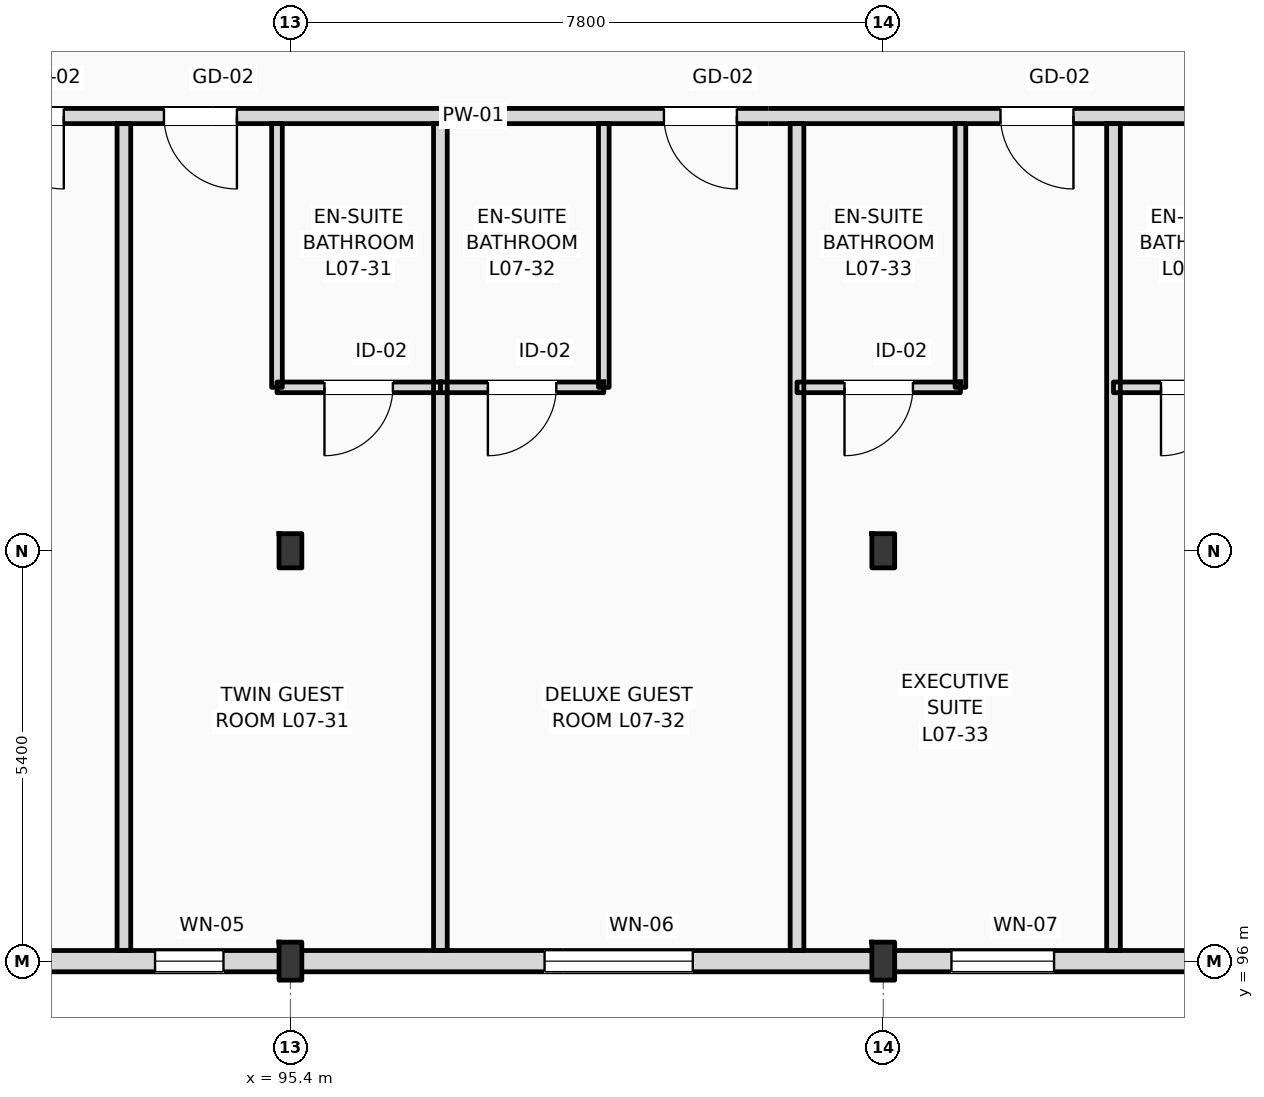
"""IFC4 building model, lengths in metres.
Left out: names, types, materials, properties, quantities, classifications, styles, units other than length and angle.
Written with IfcOpenShell. Run it as: python <this file> out.ifc"""

import sys

from ifc_helpers import new_model, si_unit, direction, frame, frame_2d, origin, origin_2d, place, context, subcontext, project, spatial, rectangle, i_section, extrude, element, fill, save


model = new_model("IFC4")
c1 = context("Model", 3, precision=1e-05, world=origin(), true_north=direction((0.0, 1.0)))
c2 = subcontext(c1, "Body", "Model", "MODEL_VIEW")
j1 = project(units=[si_unit("LENGTHUNIT", "METRE"), si_unit("PLANEANGLEUNIT", "RADIAN")], contexts=[c1])
p1 = place(None, origin())
s1 = spatial("IfcSite", under=j1, at=p1, CompositionType="ELEMENT")
p2 = place(p1, origin())
s2 = spatial("IfcBuilding", under=s1, at=p2, CompositionType="ELEMENT")
p3 = place(p2, frame((0.0, 0.0, 31.8)))
s3 = spatial("IfcBuildingStorey", under=s2, at=p3, CompositionType="ELEMENT", Elevation=31.8)
p4 = place(p3, frame((95.4, 96.0, 0.0), z_axis=(0.0, 0.0, 1.0), x_axis=(1.0, 0.0, 0.0)))
e1 = element("IfcColumn", 1, at=p4, inside=s3, PredefinedType="COLUMN", context=c2, shape_type="SweptSolid", body=[
    extrude(i_section(OverallWidth=0.3, OverallDepth=0.5, WebThickness=0.014, FlangeThickness=0.028, FilletRadius=0.027, at=origin_2d()), origin(), (0.0, 0.0, 1.0), 3.6),
])
p5 = place(p3, frame((95.4, 101.4, 0.0), z_axis=(0.0, 0.0, 1.0), x_axis=(1.0, 0.0, 0.0)))
e2 = element("IfcColumn", 2, at=p5, inside=s3, PredefinedType="COLUMN", context=c2, shape_type="SweptSolid", body=[
    extrude(i_section(OverallWidth=0.3, OverallDepth=0.45, WebThickness=0.014, FlangeThickness=0.026, FilletRadius=0.027, at=origin_2d()), origin(), (0.0, 0.0, 1.0), 3.6),
])
p6 = place(p3, frame((103.2, 96.0, 0.0), z_axis=(0.0, 0.0, 1.0), x_axis=(1.0, 0.0, 0.0)))
e3 = element("IfcColumn", 3, at=p6, inside=s3, PredefinedType="COLUMN", context=c2, shape_type="SweptSolid", body=[
    extrude(i_section(OverallWidth=0.3, OverallDepth=0.5, WebThickness=0.014, FlangeThickness=0.028, FilletRadius=0.027, at=origin_2d()), origin(), (0.0, 0.0, 1.0), 3.6),
])
p7 = place(p3, frame((103.2, 101.4, 0.0), z_axis=(0.0, 0.0, 1.0), x_axis=(1.0, 0.0, 0.0)))
e4 = element("IfcColumn", 4, at=p7, inside=s3, PredefinedType="COLUMN", context=c2, shape_type="SweptSolid", body=[
    extrude(i_section(OverallWidth=0.3, OverallDepth=0.45, WebThickness=0.014, FlangeThickness=0.026, FilletRadius=0.027, at=origin_2d()), origin(), (0.0, 0.0, 1.0), 3.6),
])
p8 = place(p3, frame((25.2, 96.0, 0.0), z_axis=(0.0, 0.0, 1.0), x_axis=(1.0, 0.0, 0.0)))
e5 = element("IfcWall", 5, at=p8, inside=s3, PredefinedType="STANDARD", context=c2, shape_type="SweptSolid", body=[
    extrude(rectangle(XDim=94.8, YDim=0.28, at=frame_2d((47.4, 0.0))), origin(), (0.0, 0.0, 1.0), 2.72),
])
p9 = place(p8, frame((16.394, 0.0, 0.9)))
e6 = element("IfcOpeningElement", 6, at=p9, cuts=e5, PredefinedType="OPENING", context=c2, shape_type="SweptSolid", body=[
    extrude(rectangle(XDim=2.0, YDim=1.64, at=frame_2d((1.0, 0.82))), frame((0.0, 0.15, 0.0), z_axis=(0.0, -1.0, 0.0), x_axis=(1.0, 0.0, 0.0)), (0.0, 0.0, 1.0), 0.3),
])
p10 = place(p8, frame((20.207, 0.0, 0.9)))
e7 = element("IfcOpeningElement", 7, at=p10, cuts=e5, PredefinedType="OPENING", context=c2, shape_type="SweptSolid", body=[
    extrude(rectangle(XDim=2.3, YDim=1.64, at=frame_2d((1.15, 0.82))), frame((0.0, 0.15, 0.0), z_axis=(0.0, -1.0, 0.0), x_axis=(1.0, 0.0, 0.0)), (0.0, 0.0, 1.0), 0.3),
])
p11 = place(p8, frame((24.287, 0.0, 0.9)))
e8 = element("IfcOpeningElement", 8, at=p11, cuts=e5, PredefinedType="OPENING", context=c2, shape_type="SweptSolid", body=[
    extrude(rectangle(XDim=2.358, YDim=1.64, at=frame_2d((1.179, 0.82))), frame((0.0, 0.15, 0.0), z_axis=(0.0, -1.0, 0.0), x_axis=(1.0, 0.0, 0.0)), (0.0, 0.0, 1.0), 0.3),
])
p12 = place(p8, frame((27.665, 0.0, 0.9)))
e9 = element("IfcOpeningElement", 9, at=p12, cuts=e5, PredefinedType="OPENING", context=c2, shape_type="SweptSolid", body=[
    extrude(rectangle(XDim=1.8, YDim=1.64, at=frame_2d((0.9, 0.82))), frame((0.0, 0.15, 0.0), z_axis=(0.0, -1.0, 0.0), x_axis=(1.0, 0.0, 0.0)), (0.0, 0.0, 1.0), 0.3),
])
p13 = place(p8, frame((32.103, 0.0, 0.9)))
e10 = element("IfcOpeningElement", 10, at=p13, cuts=e5, PredefinedType="OPENING", context=c2, shape_type="SweptSolid", body=[
    extrude(rectangle(XDim=2.359, YDim=1.64, at=frame_2d((1.179, 0.82))), frame((0.0, 0.15, 0.0), z_axis=(0.0, -1.0, 0.0), x_axis=(1.0, 0.0, 0.0)), (0.0, 0.0, 1.0), 0.3),
])
p14 = place(p8, frame((36.336, 0.0, 0.9)))
e11 = element("IfcOpeningElement", 11, at=p14, cuts=e5, PredefinedType="OPENING", context=c2, shape_type="SweptSolid", body=[
    extrude(rectangle(XDim=1.2, YDim=1.64, at=frame_2d((0.6, 0.82))), frame((0.0, 0.15, 0.0), z_axis=(0.0, -1.0, 0.0), x_axis=(1.0, 0.0, 0.0)), (0.0, 0.0, 1.0), 0.3),
])
p15 = place(p8, frame((56.177, 0.0, 0.9)))
e12 = element("IfcOpeningElement", 12, at=p15, cuts=e5, PredefinedType="OPENING", context=c2, shape_type="SweptSolid", body=[
    extrude(rectangle(XDim=1.35, YDim=1.64, at=frame_2d((0.675, 0.82))), frame((0.0, 0.15, 0.0), z_axis=(0.0, -1.0, 0.0), x_axis=(1.0, 0.0, 0.0)), (0.0, 0.0, 1.0), 0.3),
])
p16 = place(p8, frame((60.086, 0.0, 0.9)))
e13 = element("IfcOpeningElement", 13, at=p16, cuts=e5, PredefinedType="OPENING", context=c2, shape_type="SweptSolid", body=[
    extrude(rectangle(XDim=1.5, YDim=1.64, at=frame_2d((0.75, 0.82))), frame((0.0, 0.15, 0.0), z_axis=(0.0, -1.0, 0.0), x_axis=(1.0, 0.0, 0.0)), (0.0, 0.0, 1.0), 0.3),
])
p17 = place(p8, frame((64.838, 0.0, 0.9)))
e14 = element("IfcOpeningElement", 14, at=p17, cuts=e5, PredefinedType="OPENING", context=c2, shape_type="SweptSolid", body=[
    extrude(rectangle(XDim=1.65, YDim=1.64, at=frame_2d((0.825, 0.82))), frame((0.0, 0.15, 0.0), z_axis=(0.0, -1.0, 0.0), x_axis=(1.0, 0.0, 0.0)), (0.0, 0.0, 1.0), 0.3),
])
p18 = place(p8, frame((68.419, 0.0, 0.9)))
e15 = element("IfcOpeningElement", 15, at=p18, cuts=e5, PredefinedType="OPENING", context=c2, shape_type="SweptSolid", body=[
    extrude(rectangle(XDim=0.9, YDim=1.64, at=frame_2d((0.45, 0.82))), frame((0.0, 0.15, 0.0), z_axis=(0.0, -1.0, 0.0), x_axis=(1.0, 0.0, 0.0)), (0.0, 0.0, 1.0), 0.3),
])
p19 = place(p8, frame((73.544, 0.0, 0.9)))
e16 = element("IfcOpeningElement", 16, at=p19, cuts=e5, PredefinedType="OPENING", context=c2, shape_type="SweptSolid", body=[
    extrude(rectangle(XDim=1.95, YDim=1.64, at=frame_2d((0.975, 0.82))), frame((0.0, 0.15, 0.0), z_axis=(0.0, -1.0, 0.0), x_axis=(1.0, 0.0, 0.0)), (0.0, 0.0, 1.0), 0.3),
])
p20 = place(p8, frame((78.897, 0.0, 0.9)))
e17 = element("IfcOpeningElement", 17, at=p20, cuts=e5, PredefinedType="OPENING", context=c2, shape_type="SweptSolid", body=[
    extrude(rectangle(XDim=1.35, YDim=1.64, at=frame_2d((0.675, 0.82))), frame((0.0, 0.15, 0.0), z_axis=(0.0, -1.0, 0.0), x_axis=(1.0, 0.0, 0.0)), (0.0, 0.0, 1.0), 0.3),
])
p21 = place(p8, frame((82.249, 0.0, 0.9)))
e18 = element("IfcOpeningElement", 18, at=p21, cuts=e5, PredefinedType="OPENING", context=c2, shape_type="SweptSolid", body=[
    extrude(rectangle(XDim=2.25, YDim=1.64, at=frame_2d((1.125, 0.82))), frame((0.0, 0.15, 0.0), z_axis=(0.0, -1.0, 0.0), x_axis=(1.0, 0.0, 0.0)), (0.0, 0.0, 1.0), 0.3),
])
p22 = place(p8, frame((87.202, 0.0, 0.9)))
e19 = element("IfcOpeningElement", 19, at=p22, cuts=e5, PredefinedType="OPENING", context=c2, shape_type="SweptSolid", body=[
    extrude(rectangle(XDim=1.8, YDim=1.64, at=frame_2d((0.9, 0.82))), frame((0.0, 0.15, 0.0), z_axis=(0.0, -1.0, 0.0), x_axis=(1.0, 0.0, 0.0)), (0.0, 0.0, 1.0), 0.3),
])
p23 = place(p8, frame((90.867, 0.0, 0.9)))
e20 = element("IfcOpeningElement", 20, at=p23, cuts=e5, PredefinedType="OPENING", context=c2, shape_type="SweptSolid", body=[
    extrude(rectangle(XDim=2.55, YDim=1.64, at=frame_2d((1.275, 0.82))), frame((0.0, 0.15, 0.0), z_axis=(0.0, -1.0, 0.0), x_axis=(1.0, 0.0, 0.0)), (0.0, 0.0, 1.0), 0.3),
])
p24 = place(p3, frame((79.76, 107.12, 0.0), z_axis=(0.0, 0.0, 1.0), x_axis=(1.0, 0.0, 0.0)))
e21 = element("IfcWall", 21, at=p24, inside=s3, PredefinedType="PARTITIONING", context=c2, shape_type="SweptSolid", body=[
    extrude(rectangle(XDim=40.1, YDim=0.2, at=frame_2d((20.05, 0.0))), origin(), (0.0, 0.0, 1.0), 3.36),
])
p25 = place(p24, frame((2.887, 0.0, 0.0)))
e22 = element("IfcOpeningElement", 22, at=p25, cuts=e21, PredefinedType="OPENING", context=c2, shape_type="SweptSolid", body=[
    extrude(rectangle(XDim=0.96, YDim=2.2, at=frame_2d((0.48, 1.1))), frame((0.0, 0.11, 0.0), z_axis=(0.0, -1.0, 0.0), x_axis=(1.0, 0.0, 0.0)), (0.0, 0.0, 1.0), 0.22),
])
p26 = place(p24, frame((5.121, 0.0, 0.0)))
e23 = element("IfcOpeningElement", 23, at=p26, cuts=e21, PredefinedType="OPENING", context=c2, shape_type="SweptSolid", body=[
    extrude(rectangle(XDim=0.96, YDim=2.2, at=frame_2d((0.48, 1.1))), frame((0.0, 0.11, 0.0), z_axis=(0.0, -1.0, 0.0), x_axis=(1.0, 0.0, 0.0)), (0.0, 0.0, 1.0), 0.22),
])
p27 = place(p24, frame((11.698, 0.0, 0.0)))
e24 = element("IfcOpeningElement", 24, at=p27, cuts=e21, PredefinedType="OPENING", context=c2, shape_type="SweptSolid", body=[
    extrude(rectangle(XDim=0.96, YDim=2.2, at=frame_2d((0.48, 1.1))), frame((0.0, 0.11, 0.0), z_axis=(0.0, -1.0, 0.0), x_axis=(1.0, 0.0, 0.0)), (0.0, 0.0, 1.0), 0.22),
])
p28 = place(p24, frame((13.976, 0.0, 0.0)))
e25 = element("IfcOpeningElement", 25, at=p28, cuts=e21, PredefinedType="OPENING", context=c2, shape_type="SweptSolid", body=[
    extrude(rectangle(XDim=0.96, YDim=2.2, at=frame_2d((0.48, 1.1))), frame((0.0, 0.11, 0.0), z_axis=(0.0, -1.0, 0.0), x_axis=(1.0, 0.0, 0.0)), (0.0, 0.0, 1.0), 0.22),
])
p29 = place(p24, frame((20.554, 0.0, 0.0)))
e26 = element("IfcOpeningElement", 26, at=p29, cuts=e21, PredefinedType="OPENING", context=c2, shape_type="SweptSolid", body=[
    extrude(rectangle(XDim=0.96, YDim=2.2, at=frame_2d((0.48, 1.1))), frame((0.0, 0.11, 0.0), z_axis=(0.0, -1.0, 0.0), x_axis=(1.0, 0.0, 0.0)), (0.0, 0.0, 1.0), 0.22),
])
p30 = place(p24, frame((24.982, 0.0, 0.0)))
e27 = element("IfcOpeningElement", 27, at=p30, cuts=e21, PredefinedType="OPENING", context=c2, shape_type="SweptSolid", body=[
    extrude(rectangle(XDim=0.96, YDim=2.2, at=frame_2d((0.48, 1.1))), frame((0.0, 0.11, 0.0), z_axis=(0.0, -1.0, 0.0), x_axis=(1.0, 0.0, 0.0)), (0.0, 0.0, 1.0), 0.22),
])
p31 = place(p24, frame((29.409, 0.0, 0.0)))
e28 = element("IfcOpeningElement", 28, at=p31, cuts=e21, PredefinedType="OPENING", context=c2, shape_type="SweptSolid", body=[
    extrude(rectangle(XDim=0.96, YDim=2.2, at=frame_2d((0.48, 1.1))), frame((0.0, 0.11, 0.0), z_axis=(0.0, -1.0, 0.0), x_axis=(1.0, 0.0, 0.0)), (0.0, 0.0, 1.0), 0.22),
])
p32 = place(p24, frame((33.837, 0.0, 0.0)))
e29 = element("IfcOpeningElement", 29, at=p32, cuts=e21, PredefinedType="OPENING", context=c2, shape_type="SweptSolid", body=[
    extrude(rectangle(XDim=0.96, YDim=2.2, at=frame_2d((0.48, 1.1))), frame((0.0, 0.11, 0.0), z_axis=(0.0, -1.0, 0.0), x_axis=(1.0, 0.0, 0.0)), (0.0, 0.0, 1.0), 0.22),
])
p33 = place(p24, frame((36.027, 0.0, 0.0)))
e30 = element("IfcOpeningElement", 30, at=p33, cuts=e21, PredefinedType="OPENING", context=c2, shape_type="SweptSolid", body=[
    extrude(rectangle(XDim=0.96, YDim=2.2, at=frame_2d((0.48, 1.1))), frame((0.0, 0.11, 0.0), z_axis=(0.0, -1.0, 0.0), x_axis=(1.0, 0.0, 0.0)), (0.0, 0.0, 1.0), 0.22),
])
for number, where, z_axis, x_axis in (
    (31, (93.209, 96.14, 0.0), (0.0, 0.0, 1.0), (0.0, 1.0, 0.0)),
    (32, (97.373, 96.14, 0.0), (0.0, 0.0, 1.0), (0.0, 1.0, 0.0)),
):
    element("IfcWall", number, at=place(p3, frame(where, z_axis=z_axis, x_axis=x_axis)), inside=s3, PredefinedType="PARTITIONING", context=c2, shape_type="SweptSolid", body=[
        extrude(rectangle(XDim=10.88, YDim=0.18, at=frame_2d((5.44, 0.0))), origin(), (0.0, 0.0, 1.0), 3.36),
    ])
p34 = place(p3, frame((95.223, 103.55, 0.0), z_axis=(0.0, 0.0, 1.0), x_axis=(0.0, 1.0, 0.0)))
e33 = element("IfcWall", 33, at=p34, inside=s3, PredefinedType="PARTITIONING", context=c2, shape_type="SweptSolid", body=[
    extrude(rectangle(XDim=3.47, YDim=0.14, at=frame_2d((1.735, 0.0))), origin(), (0.0, 0.0, 1.0), 2.91),
])
p35 = place(p3, frame((95.223, 103.55, 0.0), z_axis=(0.0, 0.0, 1.0), x_axis=(1.0, 0.0, 0.0)))
e34 = element("IfcWall", 34, at=p35, inside=s3, PredefinedType="PARTITIONING", context=c2, shape_type="SweptSolid", body=[
    extrude(rectangle(XDim=2.15, YDim=0.14, at=frame_2d((1.075, 0.0))), origin(), (0.0, 0.0, 1.0), 3.36),
])
p36 = place(p35, frame((0.625, 0.0, 0.0)))
e35 = element("IfcOpeningElement", 35, at=p36, cuts=e34, PredefinedType="OPENING", context=c2, shape_type="SweptSolid", body=[
    extrude(rectangle(XDim=0.9, YDim=2.1, at=frame_2d((0.45, 1.05))), frame((0.0, 0.08, 0.0), z_axis=(0.0, -1.0, 0.0), x_axis=(1.0, 0.0, 0.0)), (0.0, 0.0, 1.0), 0.16),
])
p37 = place(p3, frame((102.065, 96.14, 0.0), z_axis=(0.0, 0.0, 1.0), x_axis=(0.0, 1.0, 0.0)))
e36 = element("IfcWall", 36, at=p37, inside=s3, PredefinedType="PARTITIONING", context=c2, shape_type="SweptSolid", body=[
    extrude(rectangle(XDim=10.88, YDim=0.18, at=frame_2d((5.44, 0.0))), origin(), (0.0, 0.0, 1.0), 3.36),
])
p38 = place(p3, frame((99.523, 103.55, 0.0), z_axis=(0.0, 0.0, 1.0), x_axis=(0.0, 1.0, 0.0)))
e37 = element("IfcWall", 37, at=p38, inside=s3, PredefinedType="PARTITIONING", context=c2, shape_type="SweptSolid", body=[
    extrude(rectangle(XDim=3.47, YDim=0.14, at=frame_2d((1.735, 0.0))), origin(), (0.0, 0.0, 1.0), 3.36),
])
p39 = place(p3, frame((97.373, 103.55, 0.0), z_axis=(0.0, 0.0, 1.0), x_axis=(1.0, 0.0, 0.0)))
e38 = element("IfcWall", 38, at=p39, inside=s3, PredefinedType="PARTITIONING", context=c2, shape_type="SweptSolid", body=[
    extrude(rectangle(XDim=2.15, YDim=0.14, at=frame_2d((1.075, 0.0))), origin(), (0.0, 0.0, 1.0), 3.36),
])
p40 = place(p39, frame((0.625, 0.0, 0.0)))
e39 = element("IfcOpeningElement", 39, at=p40, cuts=e38, PredefinedType="OPENING", context=c2, shape_type="SweptSolid", body=[
    extrude(rectangle(XDim=0.9, YDim=2.1, at=frame_2d((0.45, 1.05))), frame((0.0, 0.08, 0.0), z_axis=(0.0, -1.0, 0.0), x_axis=(1.0, 0.0, 0.0)), (0.0, 0.0, 1.0), 0.16),
])
p41 = place(p3, frame((106.229, 96.14, 0.0), z_axis=(0.0, 0.0, 1.0), x_axis=(0.0, 1.0, 0.0)))
e40 = element("IfcWall", 40, at=p41, inside=s3, PredefinedType="PARTITIONING", context=c2, shape_type="SweptSolid", body=[
    extrude(rectangle(XDim=10.88, YDim=0.18, at=frame_2d((5.44, 0.0))), origin(), (0.0, 0.0, 1.0), 2.97),
])
p42 = place(p3, frame((104.215, 103.55, 0.0), z_axis=(0.0, 0.0, 1.0), x_axis=(0.0, 1.0, 0.0)))
e41 = element("IfcWall", 41, at=p42, inside=s3, PredefinedType="PARTITIONING", context=c2, shape_type="SweptSolid", body=[
    extrude(rectangle(XDim=3.47, YDim=0.14, at=frame_2d((1.735, 0.0))), origin(), (0.0, 0.0, 1.0), 3.36),
])
p43 = place(p3, frame((102.065, 103.55, 0.0), z_axis=(0.0, 0.0, 1.0), x_axis=(1.0, 0.0, 0.0)))
e42 = element("IfcWall", 42, at=p43, inside=s3, PredefinedType="PARTITIONING", context=c2, shape_type="SweptSolid", body=[
    extrude(rectangle(XDim=2.15, YDim=0.14, at=frame_2d((1.075, 0.0))), origin(), (0.0, 0.0, 1.0), 3.36),
])
p44 = place(p43, frame((0.625, 0.0, 0.0)))
e43 = element("IfcOpeningElement", 43, at=p44, cuts=e42, PredefinedType="OPENING", context=c2, shape_type="SweptSolid", body=[
    extrude(rectangle(XDim=0.9, YDim=2.1, at=frame_2d((0.45, 1.05))), frame((0.0, 0.08, 0.0), z_axis=(0.0, -1.0, 0.0), x_axis=(1.0, 0.0, 0.0)), (0.0, 0.0, 1.0), 0.16),
])
p45 = place(p3, frame((106.229, 103.55, 0.0), z_axis=(0.0, 0.0, 1.0), x_axis=(1.0, 0.0, 0.0)))
e44 = element("IfcWall", 44, at=p45, inside=s3, PredefinedType="PARTITIONING", context=c2, shape_type="SweptSolid", body=[
    extrude(rectangle(XDim=2.15, YDim=0.14, at=frame_2d((1.075, 0.0))), origin(), (0.0, 0.0, 1.0), 3.36),
])
p46 = place(p45, frame((0.625, 0.0, 0.0)))
e45 = element("IfcOpeningElement", 45, at=p46, cuts=e44, PredefinedType="OPENING", context=c2, shape_type="SweptSolid", body=[
    extrude(rectangle(XDim=0.9, YDim=2.1, at=frame_2d((0.45, 1.05))), frame((0.0, 0.08, 0.0), z_axis=(0.0, -1.0, 0.0), x_axis=(1.0, 0.0, 0.0)), (0.0, 0.0, 1.0), 0.16),
])
p47 = place(p18, origin())
e46 = element("IfcWindow", 46, at=p47, inside=s3, PartitioningType="DOUBLE_PANEL_VERTICAL", PredefinedType="WINDOW", context=c2, shape_type="SweptSolid", body=[
    extrude(rectangle(XDim=0.9, YDim=1.64, at=frame_2d((0.45, 0.82))), frame((0.0, 0.03, 0.0), z_axis=(0.0, -1.0, 0.0), x_axis=(1.0, 0.0, 0.0)), (0.0, 0.0, 1.0), 0.06),
])
fill(e15, e46)
p48 = place(p19, origin())
e47 = element("IfcWindow", 47, at=p48, inside=s3, PartitioningType="DOUBLE_PANEL_VERTICAL", PredefinedType="WINDOW", context=c2, shape_type="SweptSolid", body=[
    extrude(rectangle(XDim=1.95, YDim=1.64, at=frame_2d((0.975, 0.82))), frame((0.0, 0.03, 0.0), z_axis=(0.0, -1.0, 0.0), x_axis=(1.0, 0.0, 0.0)), (0.0, 0.0, 1.0), 0.06),
])
fill(e16, e47)
p49 = place(p20, origin())
e48 = element("IfcWindow", 48, at=p49, inside=s3, PartitioningType="DOUBLE_PANEL_VERTICAL", PredefinedType="WINDOW", context=c2, shape_type="SweptSolid", body=[
    extrude(rectangle(XDim=1.35, YDim=1.64, at=frame_2d((0.675, 0.82))), frame((0.0, 0.03, 0.0), z_axis=(0.0, -1.0, 0.0), x_axis=(1.0, 0.0, 0.0)), (0.0, 0.0, 1.0), 0.06),
])
fill(e17, e48)
p50 = place(p27, frame((0.96, 0.0, 0.0), z_axis=(0.0, 0.0, 1.0), x_axis=(-1.0, 0.0, 0.0)))
e49 = element("IfcDoor", 49, at=p50, inside=s3, OperationType="SINGLE_SWING_RIGHT", PredefinedType="DOOR", context=c2, shape_type="SweptSolid", body=[
    extrude(rectangle(XDim=0.96, YDim=2.2, at=frame_2d((0.48, 1.1))), frame((0.0, 0.025, 0.0), z_axis=(0.0, -1.0, 0.0), x_axis=(1.0, 0.0, 0.0)), (0.0, 0.0, 1.0), 0.05),
])
fill(e24, e49)
p51 = place(p28, frame((0.96, 0.0, 0.0), z_axis=(0.0, 0.0, 1.0), x_axis=(-1.0, 0.0, 0.0)))
e50 = element("IfcDoor", 50, at=p51, inside=s3, OperationType="SINGLE_SWING_RIGHT", PredefinedType="DOOR", context=c2, shape_type="SweptSolid", body=[
    extrude(rectangle(XDim=0.96, YDim=2.2, at=frame_2d((0.48, 1.1))), frame((0.0, 0.025, 0.0), z_axis=(0.0, -1.0, 0.0), x_axis=(1.0, 0.0, 0.0)), (0.0, 0.0, 1.0), 0.05),
])
fill(e25, e50)
p52 = place(p36, frame((0.9, 0.0, 0.0), z_axis=(0.0, 0.0, 1.0), x_axis=(-1.0, 0.0, 0.0)))
e51 = element("IfcDoor", 51, at=p52, inside=s3, OperationType="SINGLE_SWING_LEFT", PredefinedType="DOOR", context=c2, shape_type="SweptSolid", body=[
    extrude(rectangle(XDim=0.9, YDim=2.1, at=frame_2d((0.45, 1.05))), frame((0.0, 0.025, 0.0), z_axis=(0.0, -1.0, 0.0), x_axis=(1.0, 0.0, 0.0)), (0.0, 0.0, 1.0), 0.05),
])
fill(e35, e51)
p53 = place(p29, frame((0.96, 0.0, 0.0), z_axis=(0.0, 0.0, 1.0), x_axis=(-1.0, 0.0, 0.0)))
e52 = element("IfcDoor", 52, at=p53, inside=s3, OperationType="SINGLE_SWING_RIGHT", PredefinedType="DOOR", context=c2, shape_type="SweptSolid", body=[
    extrude(rectangle(XDim=0.96, YDim=2.2, at=frame_2d((0.48, 1.1))), frame((0.0, 0.025, 0.0), z_axis=(0.0, -1.0, 0.0), x_axis=(1.0, 0.0, 0.0)), (0.0, 0.0, 1.0), 0.05),
])
fill(e26, e52)
p54 = place(p40, frame((0.9, 0.0, 0.0), z_axis=(0.0, 0.0, 1.0), x_axis=(-1.0, 0.0, 0.0)))
e53 = element("IfcDoor", 53, at=p54, inside=s3, OperationType="SINGLE_SWING_LEFT", PredefinedType="DOOR", context=c2, shape_type="SweptSolid", body=[
    extrude(rectangle(XDim=0.9, YDim=2.1, at=frame_2d((0.45, 1.05))), frame((0.0, 0.025, 0.0), z_axis=(0.0, -1.0, 0.0), x_axis=(1.0, 0.0, 0.0)), (0.0, 0.0, 1.0), 0.05),
])
fill(e39, e53)
p55 = place(p30, frame((0.96, 0.0, 0.0), z_axis=(0.0, 0.0, 1.0), x_axis=(-1.0, 0.0, 0.0)))
e54 = element("IfcDoor", 54, at=p55, inside=s3, OperationType="SINGLE_SWING_RIGHT", PredefinedType="DOOR", context=c2, shape_type="SweptSolid", body=[
    extrude(rectangle(XDim=0.96, YDim=2.2, at=frame_2d((0.48, 1.1))), frame((0.0, 0.025, 0.0), z_axis=(0.0, -1.0, 0.0), x_axis=(1.0, 0.0, 0.0)), (0.0, 0.0, 1.0), 0.05),
])
fill(e27, e54)
p56 = place(p44, frame((0.9, 0.0, 0.0), z_axis=(0.0, 0.0, 1.0), x_axis=(-1.0, 0.0, 0.0)))
e55 = element("IfcDoor", 55, at=p56, inside=s3, OperationType="SINGLE_SWING_LEFT", PredefinedType="DOOR", context=c2, shape_type="SweptSolid", body=[
    extrude(rectangle(XDim=0.9, YDim=2.1, at=frame_2d((0.45, 1.05))), frame((0.0, 0.025, 0.0), z_axis=(0.0, -1.0, 0.0), x_axis=(1.0, 0.0, 0.0)), (0.0, 0.0, 1.0), 0.05),
])
fill(e43, e55)
p57 = place(p46, frame((0.9, 0.0, 0.0), z_axis=(0.0, 0.0, 1.0), x_axis=(-1.0, 0.0, 0.0)))
e56 = element("IfcDoor", 56, at=p57, inside=s3, OperationType="SINGLE_SWING_LEFT", PredefinedType="DOOR", context=c2, shape_type="SweptSolid", body=[
    extrude(rectangle(XDim=0.9, YDim=2.1, at=frame_2d((0.45, 1.05))), frame((0.0, 0.025, 0.0), z_axis=(0.0, -1.0, 0.0), x_axis=(1.0, 0.0, 0.0)), (0.0, 0.0, 1.0), 0.05),
])
fill(e45, e56)
save(model, sys.argv[1])
